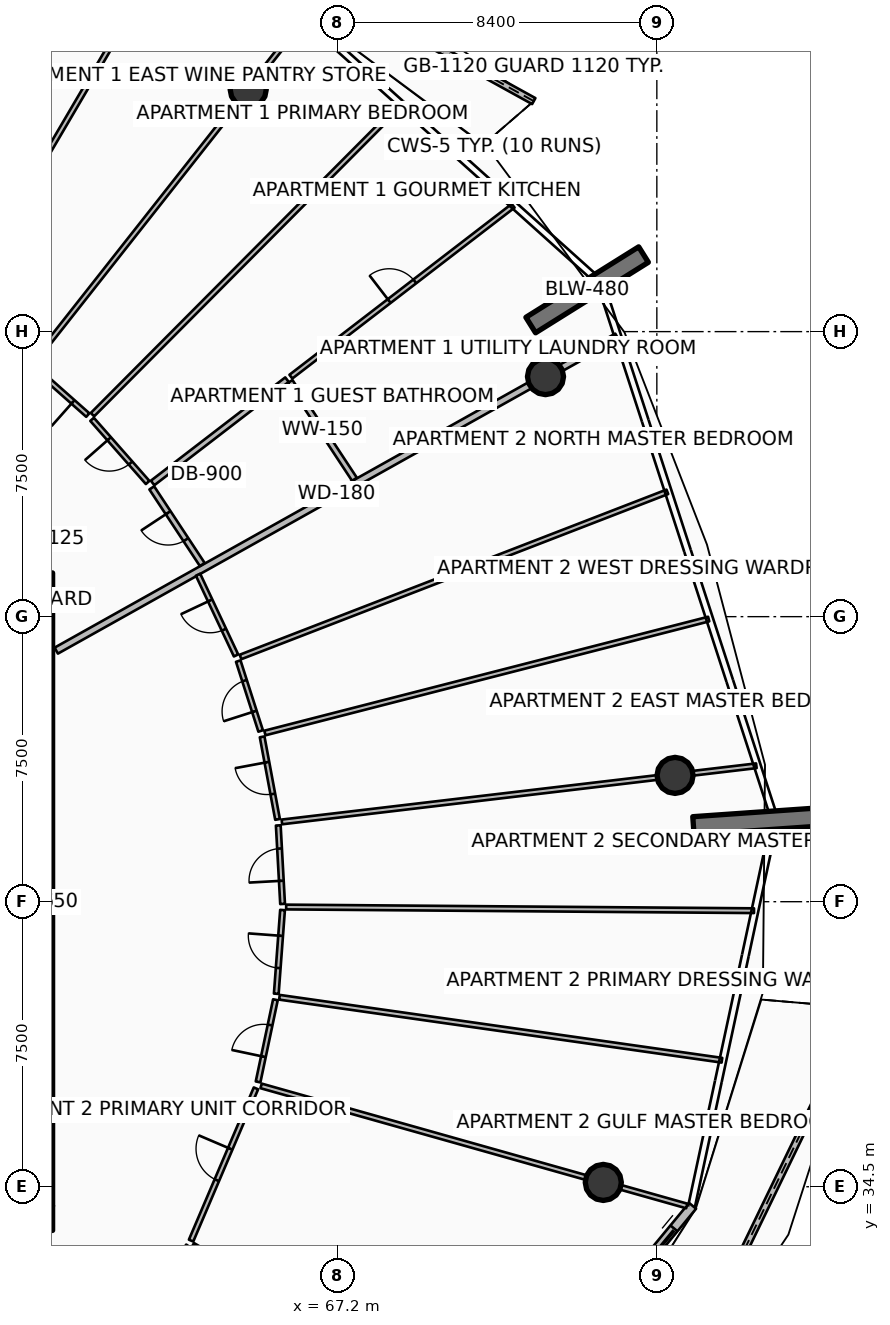
"""IFC4 building model, lengths in metres.
Left out: names, types, materials, properties, quantities, classifications, styles, units other than length and angle.
Written with IfcOpenShell. Run it as: python <this file> out.ifc"""

import sys

from ifc_helpers import new_model, si_unit, direction, frame, frame_2d, origin, origin_2d, place, context, subcontext, project, spatial, polyline, rectangle, circle, outline, extrude, element, fill, save


model = new_model("IFC4")
c1 = context("Model", 3, precision=1e-05, world=origin(), true_north=direction((0.0, 1.0)))
c2 = subcontext(c1, "Body", "Model", "MODEL_VIEW")
j1 = project(units=[si_unit("LENGTHUNIT", "METRE"), si_unit("PLANEANGLEUNIT", "RADIAN")], contexts=[c1])
p1 = place(None, origin())
s1 = spatial("IfcSite", under=j1, at=p1, CompositionType="ELEMENT")
p2 = place(p1, origin())
s2 = spatial("IfcBuilding", under=s1, at=p2, CompositionType="ELEMENT")
p3 = place(p2, frame((0.0, 0.0, 244.4)))
s3 = spatial("IfcBuildingStorey", under=s2, at=p3, CompositionType="ELEMENT", Elevation=244.4)
for number, where, z_axis, x_axis in (
    (1, (49.95, 33.675, 0.0), (0.0, 0.0, 1.0), (1.0, 0.0, 0.0)),
    (2, (49.95, 50.325, 0.0), (0.0, 0.0, 1.0), (1.0, 0.0, 0.0)),
):
    element("IfcWall", number, at=place(p3, frame(where, z_axis=z_axis, x_axis=x_axis)), inside=s3, PredefinedType="SHEAR", context=c2, shape_type="SweptSolid", body=[
        extrude(rectangle(XDim=9.75, YDim=0.65, at=frame_2d((4.875, 0.0))), origin(), (0.0, 0.0, 1.0), 3.85),
    ])
p4 = place(p3, frame((59.375, 34.0, 0.0), z_axis=(0.0, 0.0, 1.0), x_axis=(0.0, 1.0, 0.0)))
e3 = element("IfcWall", 3, at=p4, inside=s3, PredefinedType="SHEAR", context=c2, shape_type="SweptSolid", body=[
    extrude(rectangle(XDim=16.0, YDim=0.65, at=frame_2d((8.0, 0.0))), origin(), (0.0, 0.0, 1.0), 3.85),
])
p5 = place(p3, frame((72.281, 57.173, 0.0), z_axis=(0.0, 0.0, 1.0), x_axis=(0.848033572426, 0.529942506352, 0.0)))
e4 = element("IfcWall", 4, at=p5, inside=s3, PredefinedType="SOLIDWALL", context=c2, shape_type="SweptSolid", body=[
    extrude(rectangle(XDim=3.5, YDim=0.48, at=frame_2d((1.75, 0.0))), origin(), (0.0, 0.0, 1.0), 3.85),
])
p6 = place(p3, frame((76.562, 43.997, 0.0), z_axis=(0.0, 0.0, 1.0), x_axis=(0.997563824095, 0.069759707979, 0.0)))
e5 = element("IfcWall", 5, at=p6, inside=s3, PredefinedType="SOLIDWALL", context=c2, shape_type="SweptSolid", body=[
    extrude(rectangle(XDim=3.5, YDim=0.48, at=frame_2d((1.75, 0.0))), origin(), (0.0, 0.0, 1.0), 3.85),
])
for number, where, z_axis, x_axis in (
    (6, (72.67, 55.816, 0.0), (0.0, 0.0, 1.0), (1.0, 0.0, 0.0)),
    (7, (64.847, 63.371, 0.0), (0.0, 0.0, 1.0), (1.0, 0.0, 0.0)),
    (8, (74.191, 34.613, 0.0), (0.0, 0.0, 1.0), (1.0, 0.0, 0.0)),
    (9, (76.08, 45.323, 0.0), (0.0, 0.0, 1.0), (1.0, 0.0, 0.0)),
):
    element("IfcColumn", number, at=place(p3, frame(where, z_axis=z_axis, x_axis=x_axis)), inside=s3, PredefinedType="COLUMN", context=c2, shape_type="SweptSolid", body=[
        extrude(circle(Radius=0.475, at=origin_2d()), origin(), (0.0, 0.0, 1.0), 3.59),
    ])
p7 = place(p3, frame((72.361, 63.065, 0.0), z_axis=(0.0, 0.0, 1.0), x_axis=(-0.875454216257, 0.483301060663, 0.0)))
e10 = element("IfcWall", 10, at=p7, inside=s3, PredefinedType="PARAPET", context=c2, shape_type="SweptSolid", body=[
    extrude(outline(polyline([(0.0, 0.0), (12.029, 0.0), (12.029, 1.148), (6.015, 1.127), (0.0, 1.224), (0.0, 0.0)])), frame((0.0, 0.09, 0.0), z_axis=(0.0, -1.0, 0.0), x_axis=(1.0, 0.0, 0.0)), (0.0, 0.0, 1.0), 0.18),
])
p8 = place(p3, frame((75.594, 28.075, 0.0), z_axis=(0.0, 0.0, 1.0), x_axis=(0.435762237374, 0.900061815921, 0.0)))
e11 = element("IfcWall", 11, at=p8, inside=s3, PredefinedType="PARAPET", context=c2, shape_type="SweptSolid", body=[
    extrude(outline(polyline([(0.0, 0.0), (12.362, 0.0), (12.362, 1.86), (6.181, 1.798), (0.0, 1.632), (0.0, 0.0)])), frame((0.0, 0.09, 0.0), z_axis=(0.0, -1.0, 0.0), x_axis=(1.0, 0.0, 0.0)), (0.0, 0.0, 1.0), 0.18),
])
p9 = place(p3, frame((69.258, 25.178, 0.0), z_axis=(0.0, 0.0, 1.0), x_axis=(0.636680093065, 0.771128043255, 0.0)))
e12 = element("IfcWall", 12, at=p9, inside=s3, PredefinedType="SOLIDWALL", context=c2, shape_type="SweptSolid", body=[
    extrude(rectangle(XDim=11.438, YDim=0.24, at=frame_2d((5.719, 0.0))), origin(), (0.0, 0.0, 1.0), 2.54),
])
p10 = place(p9, frame((9.218, 0.0, 0.0)))
e13 = element("IfcOpeningElement", 13, at=p10, cuts=e12, PredefinedType="OPENING", context=c2, shape_type="SweptSolid", body=[
    extrude(rectangle(XDim=1.45, YDim=2.15, at=frame_2d((0.725, 1.075))), frame((0.0, 0.13, 0.0), z_axis=(0.0, -1.0, 0.0), x_axis=(1.0, 0.0, 0.0)), (0.0, 0.0, 1.0), 0.26),
])
p11 = place(p9, frame((0.28, 0.0, 0.65)))
e14 = element("IfcOpeningElement", 14, at=p11, cuts=e12, PredefinedType="OPENING", context=c2, shape_type="SweptSolid", body=[
    extrude(rectangle(XDim=1.6, YDim=1.5, at=frame_2d((0.8, 0.75))), frame((0.0, 0.13, 0.0), z_axis=(0.0, -1.0, 0.0), x_axis=(1.0, 0.0, 0.0)), (0.0, 0.0, 1.0), 0.26),
])
p12 = place(p3, frame((59.796, 48.606, 0.0), z_axis=(0.0, 0.0, 1.0), x_axis=(0.872493213488, 0.488626229767, 0.0)))
e15 = element("IfcWall", 15, at=p12, inside=s3, PredefinedType="PARTITIONING", context=c2, shape_type="SweptSolid", body=[
    extrude(rectangle(XDim=16.91, YDim=0.18, at=frame_2d((8.455, 0.0))), origin(), (0.0, 0.0, 1.0), 2.957),
])
p13 = place(p3, frame((63.639, 50.872, 0.0), z_axis=(0.0, 0.0, 1.0), x_axis=(-0.550539267926, 0.834809268319, 0.0)))
e16 = element("IfcWall", 16, at=p13, inside=s3, PredefinedType="PARTITIONING", context=c2, shape_type="SweptSolid", body=[
    extrude(rectangle(XDim=2.414, YDim=0.15, at=frame_2d((1.207, 0.0))), origin(), (0.0, 0.0, 1.0), 2.957),
])
p14 = place(p13, frame((0.782, 0.0, 0.0)))
e17 = element("IfcOpeningElement", 17, at=p14, cuts=e16, PredefinedType="OPENING", context=c2, shape_type="SweptSolid", body=[
    extrude(rectangle(XDim=0.85, YDim=2.06, at=frame_2d((0.425, 1.03))), frame((0.0, 0.085, 0.0), z_axis=(0.0, -1.0, 0.0), x_axis=(1.0, 0.0, 0.0)), (0.0, 0.0, 1.0), 0.17),
])
p15 = place(p3, frame((67.643, 53.115, 0.0), z_axis=(0.0, 0.0, 1.0), x_axis=(-0.550484224605, 0.834845565635, 0.0)))
e18 = element("IfcWall", 18, at=p15, inside=s3, PredefinedType="PARTITIONING", context=c2, shape_type="SweptSolid", body=[
    extrude(rectangle(XDim=3.079, YDim=0.15, at=frame_2d((1.54, 0.0))), origin(), (0.0, 0.0, 1.0), 2.957),
])
p16 = place(p3, frame((62.331, 53.018, 0.0), z_axis=(0.0, 0.0, 1.0), x_axis=(0.792803030826, 0.609477935871, 0.0)))
e19 = element("IfcWall", 19, at=p16, inside=s3, PredefinedType="PARTITIONING", context=c2, shape_type="SweptSolid", body=[
    extrude(rectangle(XDim=4.46, YDim=0.15, at=frame_2d((2.23, 0.0))), origin(), (0.0, 0.0, 1.0), 3.03),
])
p17 = place(p3, frame((65.97, 55.815, 0.0), z_axis=(0.0, 0.0, 1.0), x_axis=(0.792798660545, 0.609483620647, 0.0)))
e20 = element("IfcWall", 20, at=p17, inside=s3, PredefinedType="PARTITIONING", context=c2, shape_type="SweptSolid", body=[
    extrude(rectangle(XDim=7.377, YDim=0.125, at=frame_2d((3.688, 0.0))), origin(), (0.0, 0.0, 1.0), 3.03),
])
p18 = place(p17, frame((3.263, 0.0, 0.0)))
e21 = element("IfcOpeningElement", 21, at=p18, cuts=e20, PredefinedType="OPENING", context=c2, shape_type="SweptSolid", body=[
    extrude(rectangle(XDim=0.85, YDim=2.06, at=frame_2d((0.425, 1.03))), frame((0.0, 0.073, 0.0), z_axis=(0.0, -1.0, 0.0), x_axis=(1.0, 0.0, 0.0)), (0.0, 0.0, 1.0), 0.145),
])
p19 = place(p3, frame((60.749, 54.815, 0.0), z_axis=(0.0, 0.0, 1.0), x_axis=(0.705267705861, 0.708941085753, 0.0)))
e22 = element("IfcWall", 22, at=p19, inside=s3, PredefinedType="PARTITIONING", context=c2, shape_type="SweptSolid", body=[
    extrude(rectangle(XDim=11.498, YDim=0.125, at=frame_2d((5.749, 0.0))), origin(), (0.0, 0.0, 1.0), 3.03),
])
p20 = place(p3, frame((62.2, 53.031, 0.0), z_axis=(0.0, 0.0, 1.0), x_axis=(-0.660650282497, 0.750693815238, 0.0)))
e23 = element("IfcWall", 23, at=p20, inside=s3, PredefinedType="PARTITIONING", context=c2, shape_type="SweptSolid", body=[
    extrude(rectangle(XDim=2.212, YDim=0.125, at=frame_2d((1.106, 0.0))), origin(), (0.0, 0.0, 1.0), 3.03),
])
p21 = place(p20, frame((0.681, 0.0, 0.0)))
e24 = element("IfcOpeningElement", 24, at=p21, cuts=e23, PredefinedType="OPENING", context=c2, shape_type="SweptSolid", body=[
    extrude(rectangle(XDim=0.85, YDim=2.06, at=frame_2d((0.425, 1.03))), frame((0.0, 0.073, 0.0), z_axis=(0.0, -1.0, 0.0), x_axis=(1.0, 0.0, 0.0)), (0.0, 0.0, 1.0), 0.145),
])
p22 = place(p3, frame((60.626, 54.805, 0.0), z_axis=(0.0, 0.0, 1.0), x_axis=(-0.748419746602, 0.663225363581, 0.0)))
e25 = element("IfcWall", 25, at=p22, inside=s3, PredefinedType="PARTITIONING", context=c2, shape_type="SweptSolid", body=[
    extrude(rectangle(XDim=1.891, YDim=0.125, at=frame_2d((0.946, 0.0))), origin(), (0.0, 0.0, 1.0), 2.957),
])
p23 = place(p22, frame((0.521, 0.0, 0.0)))
e26 = element("IfcOpeningElement", 26, at=p23, cuts=e25, PredefinedType="OPENING", context=c2, shape_type="SweptSolid", body=[
    extrude(rectangle(XDim=0.85, YDim=2.06, at=frame_2d((0.425, 1.03))), frame((0.0, 0.073, 0.0), z_axis=(0.0, -1.0, 0.0), x_axis=(1.0, 0.0, 0.0)), (0.0, 0.0, 1.0), 0.145),
])
p24 = place(p3, frame((59.198, 56.204, 0.0), z_axis=(0.0, 0.0, 1.0), x_axis=(0.619101452742, 0.785311015593, 0.0)))
e27 = element("IfcWall", 27, at=p24, inside=s3, PredefinedType="PARTITIONING", context=c2, shape_type="SweptSolid", body=[
    extrude(rectangle(XDim=11.509, YDim=0.125, at=frame_2d((5.754, 0.0))), origin(), (0.0, 0.0, 1.0), 2.957),
])
p25 = place(p3, frame((57.153, 57.588, 0.0), z_axis=(0.0, 0.0, 1.0), x_axis=(0.506323477253, 0.862343630105, 0.0)))
e28 = element("IfcWall", 28, at=p25, inside=s3, PredefinedType="PARTITIONING", context=c2, shape_type="SweptSolid", body=[
    extrude(rectangle(XDim=9.988, YDim=0.125, at=frame_2d((4.994, 0.0))), origin(), (0.0, 0.0, 1.0), 3.03),
])
p26 = place(p3, frame((63.39, 32.963, 0.0), z_axis=(0.0, 0.0, 1.0), x_axis=(0.862331921897, -0.506343417532, 0.0)))
e29 = element("IfcWall", 29, at=p26, inside=s3, PredefinedType="PARTITIONING", context=c2, shape_type="SweptSolid", body=[
    extrude(rectangle(XDim=9.478, YDim=0.125, at=frame_2d((4.739, 0.0))), origin(), (0.0, 0.0, 1.0), 3.03),
])
p27 = place(p3, frame((62.001, 31.089, 0.0), z_axis=(0.0, 0.0, 1.0), x_axis=(0.564052095913, 0.825739204044, 0.0)))
e30 = element("IfcWall", 30, at=p27, inside=s3, PredefinedType="PARTITIONING", context=c2, shape_type="SweptSolid", body=[
    extrude(rectangle(XDim=2.245, YDim=0.125, at=frame_2d((1.122, 0.0))), origin(), (0.0, 0.0, 1.0), 2.957),
])
p28 = place(p27, frame((0.698, 0.0, 0.0)))
e31 = element("IfcOpeningElement", 31, at=p28, cuts=e30, PredefinedType="OPENING", context=c2, shape_type="SweptSolid", body=[
    extrude(rectangle(XDim=0.85, YDim=2.06, at=frame_2d((0.425, 1.03))), frame((0.0, 0.073, 0.0), z_axis=(0.0, -1.0, 0.0), x_axis=(1.0, 0.0, 0.0)), (0.0, 0.0, 1.0), 0.145),
])
p29 = place(p3, frame((63.344, 33.083, 0.0), z_axis=(0.0, 0.0, 1.0), x_axis=(0.392064212371, 0.919937852998, 0.0)))
e32 = element("IfcWall", 32, at=p29, inside=s3, PredefinedType="PARTITIONING", context=c2, shape_type="SweptSolid", body=[
    extrude(rectangle(XDim=4.354, YDim=0.125, at=frame_2d((2.177, 0.0))), origin(), (0.0, 0.0, 1.0), 2.957),
])
p30 = place(p29, frame((1.727, 0.0, 0.0)))
e33 = element("IfcOpeningElement", 33, at=p30, cuts=e32, PredefinedType="OPENING", context=c2, shape_type="SweptSolid", body=[
    extrude(rectangle(XDim=0.9, YDim=2.08, at=frame_2d((0.45, 1.04))), frame((0.0, 0.073, 0.0), z_axis=(0.0, -1.0, 0.0), x_axis=(1.0, 0.0, 0.0)), (0.0, 0.0, 1.0), 0.145),
])
p31 = place(p3, frame((65.187, 37.153, 0.0), z_axis=(0.0, 0.0, 1.0), x_axis=(0.962455577867, -0.271439239301, 0.0)))
e34 = element("IfcWall", 34, at=p31, inside=s3, PredefinedType="PARTITIONING", context=c2, shape_type="SweptSolid", body=[
    extrude(rectangle(XDim=11.639, YDim=0.125, at=frame_2d((5.819, 0.0))), origin(), (0.0, 0.0, 1.0), 2.957),
])
p32 = place(p3, frame((65.669, 39.485, 0.0), z_axis=(0.0, 0.0, 1.0), x_axis=(0.990022432034, -0.140909843761, 0.0)))
e35 = element("IfcWall", 35, at=p32, inside=s3, PredefinedType="PARTITIONING", context=c2, shape_type="SweptSolid", body=[
    extrude(rectangle(XDim=11.761, YDim=0.125, at=frame_2d((5.88, 0.0))), origin(), (0.0, 0.0, 1.0), 3.03),
])
p33 = place(p3, frame((65.846, 41.86, 0.0), z_axis=(0.0, 0.0, 1.0), x_axis=(0.999969162233, -0.007853316706, 0.0)))
e36 = element("IfcWall", 36, at=p33, inside=s3, PredefinedType="PARTITIONING", context=c2, shape_type="SweptSolid", body=[
    extrude(rectangle(XDim=12.311, YDim=0.125, at=frame_2d((6.155, 0.0))), origin(), (0.0, 0.0, 1.0), 3.03),
])
p34 = place(p3, frame((65.107, 37.258, 0.0), z_axis=(0.0, 0.0, 1.0), x_axis=(0.20677346991, 0.978388845062, 0.0)))
e37 = element("IfcWall", 37, at=p34, inside=s3, PredefinedType="PARTITIONING", context=c2, shape_type="SweptSolid", body=[
    extrude(rectangle(XDim=2.209, YDim=0.125, at=frame_2d((1.104, 0.0))), origin(), (0.0, 0.0, 1.0), 2.957),
])
p35 = place(p34, frame((0.68, 0.0, 0.0)))
e38 = element("IfcOpeningElement", 38, at=p35, cuts=e37, PredefinedType="OPENING", context=c2, shape_type="SweptSolid", body=[
    extrude(rectangle(XDim=0.85, YDim=2.06, at=frame_2d((0.425, 1.03))), frame((0.0, 0.073, 0.0), z_axis=(0.0, -1.0, 0.0), x_axis=(1.0, 0.0, 0.0)), (0.0, 0.0, 1.0), 0.145),
])
p36 = place(p3, frame((65.586, 39.578, 0.0), z_axis=(0.0, 0.0, 1.0), x_axis=(0.074490462528, 0.997221726093, 0.0)))
e39 = element("IfcWall", 39, at=p36, inside=s3, PredefinedType="PARTITIONING", context=c2, shape_type="SweptSolid", body=[
    extrude(rectangle(XDim=2.209, YDim=0.125, at=frame_2d((1.104, 0.0))), origin(), (0.0, 0.0, 1.0), 3.03),
])
p37 = place(p36, frame((0.679, 0.0, 0.0)))
e40 = element("IfcOpeningElement", 40, at=p37, cuts=e39, PredefinedType="OPENING", context=c2, shape_type="SweptSolid", body=[
    extrude(rectangle(XDim=0.85, YDim=2.06, at=frame_2d((0.425, 1.03))), frame((0.0, 0.073, 0.0), z_axis=(0.0, -1.0, 0.0), x_axis=(1.0, 0.0, 0.0)), (0.0, 0.0, 1.0), 0.145),
])
p38 = place(p3, frame((65.752, 41.94, 0.0), z_axis=(0.0, 0.0, 1.0), x_axis=(-0.055084577693, 0.998481692021, 0.0)))
e41 = element("IfcWall", 41, at=p38, inside=s3, PredefinedType="PARTITIONING", context=c2, shape_type="SweptSolid", body=[
    extrude(rectangle(XDim=2.07, YDim=0.125, at=frame_2d((1.035, 0.0))), origin(), (0.0, 0.0, 1.0), 2.957),
])
p39 = place(p38, frame((0.61, 0.0, 0.0)))
e42 = element("IfcOpeningElement", 42, at=p39, cuts=e41, PredefinedType="OPENING", context=c2, shape_type="SweptSolid", body=[
    extrude(rectangle(XDim=0.85, YDim=2.06, at=frame_2d((0.425, 1.03))), frame((0.0, 0.073, 0.0), z_axis=(0.0, -1.0, 0.0), x_axis=(1.0, 0.0, 0.0)), (0.0, 0.0, 1.0), 0.145),
])
p40 = place(p3, frame((65.733, 44.099, 0.0), z_axis=(0.0, 0.0, 1.0), x_axis=(0.99306831242, 0.117538618625, 0.0)))
e43 = element("IfcWall", 43, at=p40, inside=s3, PredefinedType="PARTITIONING", context=c2, shape_type="SweptSolid", body=[
    extrude(rectangle(XDim=12.573, YDim=0.125, at=frame_2d((6.286, 0.0))), origin(), (0.0, 0.0, 1.0), 2.957),
])
p41 = place(p3, frame((65.286, 46.438, 0.0), z_axis=(0.0, 0.0, 1.0), x_axis=(0.968583991447, 0.248686653265, 0.0)))
e44 = element("IfcWall", 44, at=p41, inside=s3, PredefinedType="PARTITIONING", context=c2, shape_type="SweptSolid", body=[
    extrude(rectangle(XDim=12.056, YDim=0.125, at=frame_2d((6.028, 0.0))), origin(), (0.0, 0.0, 1.0), 3.03),
])
p42 = place(p3, frame((64.645, 48.439, 0.0), z_axis=(0.0, 0.0, 1.0), x_axis=(0.93263897003, 0.360810963778, 0.0)))
e45 = element("IfcWall", 45, at=p42, inside=s3, PredefinedType="PARTITIONING", context=c2, shape_type="SweptSolid", body=[
    extrude(rectangle(XDim=12.043, YDim=0.125, at=frame_2d((6.021, 0.0))), origin(), (0.0, 0.0, 1.0), 3.03),
])
p43 = place(p3, frame((65.619, 44.166, 0.0), z_axis=(0.0, 0.0, 1.0), x_axis=(-0.183454395516, 0.983028221755, 0.0)))
e46 = element("IfcWall", 46, at=p43, inside=s3, PredefinedType="PARTITIONING", context=c2, shape_type="SweptSolid", body=[
    extrude(rectangle(XDim=2.209, YDim=0.125, at=frame_2d((1.104, 0.0))), origin(), (0.0, 0.0, 1.0), 2.957),
])
p44 = place(p43, frame((0.68, 0.0, 0.0)))
e47 = element("IfcOpeningElement", 47, at=p44, cuts=e46, PredefinedType="OPENING", context=c2, shape_type="SweptSolid", body=[
    extrude(rectangle(XDim=0.85, YDim=2.06, at=frame_2d((0.425, 1.03))), frame((0.0, 0.073, 0.0), z_axis=(0.0, -1.0, 0.0), x_axis=(1.0, 0.0, 0.0)), (0.0, 0.0, 1.0), 0.145),
])
p45 = place(p3, frame((65.175, 46.492, 0.0), z_axis=(0.0, 0.0, 1.0), x_axis=(-0.305358332679, 0.952237516938, 0.0)))
e48 = element("IfcWall", 48, at=p45, inside=s3, PredefinedType="PARTITIONING", context=c2, shape_type="SweptSolid", body=[
    extrude(rectangle(XDim=1.931, YDim=0.125, at=frame_2d((0.965, 0.0))), origin(), (0.0, 0.0, 1.0), 3.03),
])
p46 = place(p45, frame((0.54, 0.0, 0.0)))
e49 = element("IfcOpeningElement", 49, at=p46, cuts=e48, PredefinedType="OPENING", context=c2, shape_type="SweptSolid", body=[
    extrude(rectangle(XDim=0.85, YDim=2.06, at=frame_2d((0.425, 1.03))), frame((0.0, 0.073, 0.0), z_axis=(0.0, -1.0, 0.0), x_axis=(1.0, 0.0, 0.0)), (0.0, 0.0, 1.0), 0.145),
])
p47 = place(p3, frame((64.527, 48.479, 0.0), z_axis=(0.0, 0.0, 1.0), x_axis=(-0.425751972865, 0.904839907167, 0.0)))
e50 = element("IfcWall", 50, at=p47, inside=s3, PredefinedType="PARTITIONING", context=c2, shape_type="SweptSolid", body=[
    extrude(rectangle(XDim=2.348, YDim=0.125, at=frame_2d((1.174, 0.0))), origin(), (0.0, 0.0, 1.0), 2.957),
])
p48 = place(p47, frame((0.749, 0.0, 0.0)))
e51 = element("IfcOpeningElement", 51, at=p48, cuts=e50, PredefinedType="OPENING", context=c2, shape_type="SweptSolid", body=[
    extrude(rectangle(XDim=0.85, YDim=2.06, at=frame_2d((0.425, 1.03))), frame((0.0, 0.073, 0.0), z_axis=(0.0, -1.0, 0.0), x_axis=(1.0, 0.0, 0.0)), (0.0, 0.0, 1.0), 0.145),
])
p49 = place(p10, origin())
e52 = element("IfcDoor", 52, at=p49, inside=s3, OperationType="DOUBLE_DOOR_SLIDING", PredefinedType="DOOR", context=c2, shape_type="SweptSolid", body=[
    extrude(rectangle(XDim=1.45, YDim=2.15, at=frame_2d((0.725, 1.075))), frame((0.0, 0.025, 0.0), z_axis=(0.0, -1.0, 0.0), x_axis=(1.0, 0.0, 0.0)), (0.0, 0.0, 1.0), 0.05),
])
fill(e13, e52)
p50 = place(p14, origin())
e53 = element("IfcDoor", 53, at=p50, inside=s3, OperationType="SINGLE_SWING_RIGHT", PredefinedType="DOOR", context=c2, shape_type="SweptSolid", body=[
    extrude(rectangle(XDim=0.85, YDim=2.06, at=frame_2d((0.425, 1.03))), frame((0.0, 0.025, 0.0), z_axis=(0.0, -1.0, 0.0), x_axis=(1.0, 0.0, 0.0)), (0.0, 0.0, 1.0), 0.05),
])
fill(e17, e53)
p51 = place(p18, origin())
e54 = element("IfcDoor", 54, at=p51, inside=s3, OperationType="SINGLE_SWING_LEFT", PredefinedType="DOOR", context=c2, shape_type="SweptSolid", body=[
    extrude(rectangle(XDim=0.85, YDim=2.06, at=frame_2d((0.425, 1.03))), frame((0.0, 0.025, 0.0), z_axis=(0.0, -1.0, 0.0), x_axis=(1.0, 0.0, 0.0)), (0.0, 0.0, 1.0), 0.05),
])
fill(e21, e54)
p52 = place(p21, origin())
e55 = element("IfcDoor", 55, at=p52, inside=s3, OperationType="SINGLE_SWING_RIGHT", PredefinedType="DOOR", context=c2, shape_type="SweptSolid", body=[
    extrude(rectangle(XDim=0.85, YDim=2.06, at=frame_2d((0.425, 1.03))), frame((0.0, 0.025, 0.0), z_axis=(0.0, -1.0, 0.0), x_axis=(1.0, 0.0, 0.0)), (0.0, 0.0, 1.0), 0.05),
])
fill(e24, e55)
p53 = place(p23, origin())
e56 = element("IfcDoor", 56, at=p53, inside=s3, OperationType="SINGLE_SWING_LEFT", PredefinedType="DOOR", context=c2, shape_type="SweptSolid", body=[
    extrude(rectangle(XDim=0.85, YDim=2.06, at=frame_2d((0.425, 1.03))), frame((0.0, 0.025, 0.0), z_axis=(0.0, -1.0, 0.0), x_axis=(1.0, 0.0, 0.0)), (0.0, 0.0, 1.0), 0.05),
])
fill(e26, e56)
p54 = place(p30, origin())
e57 = element("IfcDoor", 57, at=p54, inside=s3, OperationType="SINGLE_SWING_RIGHT", PredefinedType="DOOR", context=c2, shape_type="SweptSolid", body=[
    extrude(rectangle(XDim=0.9, YDim=2.08, at=frame_2d((0.45, 1.04))), frame((0.0, 0.025, 0.0), z_axis=(0.0, -1.0, 0.0), x_axis=(1.0, 0.0, 0.0)), (0.0, 0.0, 1.0), 0.05),
])
fill(e33, e57)
p55 = place(p35, origin())
e58 = element("IfcDoor", 58, at=p55, inside=s3, OperationType="SINGLE_SWING_LEFT", PredefinedType="DOOR", context=c2, shape_type="SweptSolid", body=[
    extrude(rectangle(XDim=0.85, YDim=2.06, at=frame_2d((0.425, 1.03))), frame((0.0, 0.025, 0.0), z_axis=(0.0, -1.0, 0.0), x_axis=(1.0, 0.0, 0.0)), (0.0, 0.0, 1.0), 0.05),
])
fill(e38, e58)
p56 = place(p37, origin())
e59 = element("IfcDoor", 59, at=p56, inside=s3, OperationType="SINGLE_SWING_RIGHT", PredefinedType="DOOR", context=c2, shape_type="SweptSolid", body=[
    extrude(rectangle(XDim=0.85, YDim=2.06, at=frame_2d((0.425, 1.03))), frame((0.0, 0.025, 0.0), z_axis=(0.0, -1.0, 0.0), x_axis=(1.0, 0.0, 0.0)), (0.0, 0.0, 1.0), 0.05),
])
fill(e40, e59)
p57 = place(p39, origin())
e60 = element("IfcDoor", 60, at=p57, inside=s3, OperationType="SINGLE_SWING_LEFT", PredefinedType="DOOR", context=c2, shape_type="SweptSolid", body=[
    extrude(rectangle(XDim=0.85, YDim=2.06, at=frame_2d((0.425, 1.03))), frame((0.0, 0.025, 0.0), z_axis=(0.0, -1.0, 0.0), x_axis=(1.0, 0.0, 0.0)), (0.0, 0.0, 1.0), 0.05),
])
fill(e42, e60)
p58 = place(p44, origin())
e61 = element("IfcDoor", 61, at=p58, inside=s3, OperationType="SINGLE_SWING_RIGHT", PredefinedType="DOOR", context=c2, shape_type="SweptSolid", body=[
    extrude(rectangle(XDim=0.85, YDim=2.06, at=frame_2d((0.425, 1.03))), frame((0.0, 0.025, 0.0), z_axis=(0.0, -1.0, 0.0), x_axis=(1.0, 0.0, 0.0)), (0.0, 0.0, 1.0), 0.05),
])
fill(e47, e61)
p59 = place(p46, origin())
e62 = element("IfcDoor", 62, at=p59, inside=s3, OperationType="SINGLE_SWING_LEFT", PredefinedType="DOOR", context=c2, shape_type="SweptSolid", body=[
    extrude(rectangle(XDim=0.85, YDim=2.06, at=frame_2d((0.425, 1.03))), frame((0.0, 0.025, 0.0), z_axis=(0.0, -1.0, 0.0), x_axis=(1.0, 0.0, 0.0)), (0.0, 0.0, 1.0), 0.05),
])
fill(e49, e62)
p60 = place(p48, origin())
e63 = element("IfcDoor", 63, at=p60, inside=s3, OperationType="SINGLE_SWING_RIGHT", PredefinedType="DOOR", context=c2, shape_type="SweptSolid", body=[
    extrude(rectangle(XDim=0.85, YDim=2.06, at=frame_2d((0.425, 1.03))), frame((0.0, 0.025, 0.0), z_axis=(0.0, -1.0, 0.0), x_axis=(1.0, 0.0, 0.0)), (0.0, 0.0, 1.0), 0.05),
])
fill(e51, e63)
save(model, sys.argv[1])
